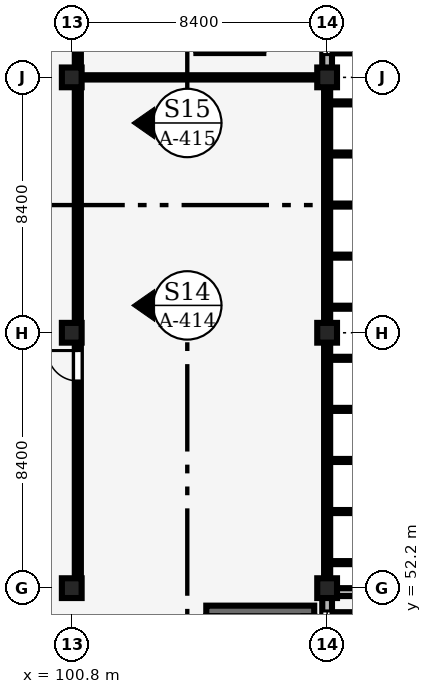
"""IFC4 building model, lengths in metres.
Left out: names, types, materials, properties, quantities, classifications, styles, units other than length and angle.
Written with IfcOpenShell. Run it as: python <this file> out.ifc"""

import sys

from ifc_helpers import new_model, si_unit, direction, frame, frame_2d, origin, origin_2d, place, context, subcontext, project, spatial, rectangle, extrude, element, fill, save


model = new_model("IFC4")
c1 = context("Model", 3, precision=1e-05, world=origin(), true_north=direction((0.0, 1.0)))
c2 = subcontext(c1, "Body", "Model", "MODEL_VIEW")
j1 = project(units=[si_unit("LENGTHUNIT", "METRE"), si_unit("PLANEANGLEUNIT", "RADIAN")], contexts=[c1])
p1 = place(None, origin())
s1 = spatial("IfcSite", under=j1, at=p1, CompositionType="ELEMENT")
p2 = place(p1, origin())
s2 = spatial("IfcBuilding", under=s1, at=p2, CompositionType="ELEMENT")
p3 = place(p2, frame((0.0, 0.0, 4.8)))
s3 = spatial("IfcBuildingStorey", under=s2, at=p3, CompositionType="ELEMENT", Elevation=4.8)
for number, where, z_axis, x_axis in (
    (1, (100.8, 52.2, 0.0), (0.0, 0.0, 1.0), (1.0, 0.0, 0.0)),
    (2, (100.8, 60.6, 0.0), (0.0, 0.0, 1.0), (1.0, 0.0, 0.0)),
    (3, (100.8, 69.0, 0.0), (0.0, 0.0, 1.0), (1.0, 0.0, 0.0)),
    (4, (109.2, 52.2, 0.0), (0.0, 0.0, 1.0), (1.0, 0.0, 0.0)),
    (5, (109.2, 60.6, 0.0), (0.0, 0.0, 1.0), (1.0, 0.0, 0.0)),
    (6, (109.2, 69.0, 0.0), (0.0, 0.0, 1.0), (1.0, 0.0, 0.0)),
):
    element("IfcColumn", number, at=place(p3, frame(where, z_axis=z_axis, x_axis=x_axis)), inside=s3, PredefinedType="COLUMN", context=c2, shape_type="SweptSolid", body=[
        extrude(rectangle(XDim=0.65, YDim=0.65, at=origin_2d()), origin(), (0.0, 0.0, 1.0), 4.2),
    ])
p4 = place(p3, frame((109.2, 44.1, 0.0), z_axis=(0.0, 0.0, 1.0), x_axis=(0.0, 1.0, 0.0)))
e7 = element("IfcWall", 7, at=p4, inside=s3, PredefinedType="SOLIDWALL", context=c2, shape_type="SweptSolid", body=[
    extrude(rectangle(XDim=7.8, YDim=0.32, at=frame_2d((3.9, 0.0))), origin(), (0.0, 0.0, 1.0), 3.3),
])
p5 = place(p4, frame((0.45, 0.0, 0.85)))
e8 = element("IfcOpeningElement", 8, at=p5, cuts=e7, PredefinedType="OPENING", context=c2, shape_type="SweptSolid", body=[
    extrude(rectangle(XDim=1.2, YDim=1.8, at=frame_2d((0.6, 0.9))), frame((0.0, 0.17, 0.0), z_axis=(0.0, -1.0, 0.0), x_axis=(1.0, 0.0, 0.0)), (0.0, 0.0, 1.0), 0.34),
])
p6 = place(p4, frame((6.15, 0.0, 0.85)))
e9 = element("IfcOpeningElement", 9, at=p6, cuts=e7, PredefinedType="OPENING", context=c2, shape_type="SweptSolid", body=[
    extrude(rectangle(XDim=1.2, YDim=1.8, at=frame_2d((0.6, 0.9))), frame((0.0, 0.17, 0.0), z_axis=(0.0, -1.0, 0.0), x_axis=(1.0, 0.0, 0.0)), (0.0, 0.0, 1.0), 0.34),
])
p7 = place(p3, frame((109.2, 69.3, 0.0), z_axis=(0.0, 0.0, 1.0), x_axis=(0.0, 1.0, 0.0)))
e10 = element("IfcWall", 10, at=p7, inside=s3, PredefinedType="SOLIDWALL", context=c2, shape_type="SweptSolid", body=[
    extrude(rectangle(XDim=7.8, YDim=0.32, at=frame_2d((3.9, 0.0))), origin(), (0.0, 0.0, 1.0), 3.25),
])
p8 = place(p7, frame((0.45, 0.0, 0.85)))
e11 = element("IfcOpeningElement", 11, at=p8, cuts=e10, PredefinedType="OPENING", context=c2, shape_type="SweptSolid", body=[
    extrude(rectangle(XDim=1.2, YDim=1.8, at=frame_2d((0.6, 0.9))), frame((0.0, 0.17, 0.0), z_axis=(0.0, -1.0, 0.0), x_axis=(1.0, 0.0, 0.0)), (0.0, 0.0, 1.0), 0.34),
])
p9 = place(p7, frame((6.15, 0.0, 0.85)))
e12 = element("IfcOpeningElement", 12, at=p9, cuts=e10, PredefinedType="OPENING", context=c2, shape_type="SweptSolid", body=[
    extrude(rectangle(XDim=1.2, YDim=1.8, at=frame_2d((0.6, 0.9))), frame((0.0, 0.17, 0.0), z_axis=(0.0, -1.0, 0.0), x_axis=(1.0, 0.0, 0.0)), (0.0, 0.0, 1.0), 0.34),
])
p10 = place(p3, frame((109.33, 52.07, 0.0), z_axis=(0.0, 0.0, 1.0), x_axis=(1.0, 0.0, 0.0)))
e13 = element("IfcWall", 13, at=p10, inside=s3, PredefinedType="PARAPET", context=c2, shape_type="SweptSolid", body=[
    extrude(rectangle(XDim=33.34, YDim=0.26, at=frame_2d((16.67, 0.0))), origin(), (0.0, 0.0, 1.0), 0.85),
])
p11 = place(p3, frame((105.225, 51.45, 0.0), z_axis=(0.0, 0.0, 1.0), x_axis=(1.0, 0.0, 0.0)))
e14 = element("IfcWall", 14, at=p11, inside=s3, PredefinedType="SHEAR", context=c2, shape_type="SweptSolid", body=[
    extrude(rectangle(XDim=3.55, YDim=0.35, at=frame_2d((1.775, 0.0))), origin(), (0.0, 0.0, 1.0), 3.92),
])
p12 = place(p3, frame((104.9, 69.85, 0.0), z_axis=(0.0, 0.0, 1.0), x_axis=(1.0, 0.0, 0.0)))
e15 = element("IfcWall", 15, at=p12, inside=s3, PredefinedType="PARTITIONING", context=c2, shape_type="SweptSolid", body=[
    extrude(rectangle(XDim=2.2, YDim=0.1, at=frame_2d((1.1, 0.0))), origin(), (0.0, 0.0, 1.0), 3.9),
])
p13 = place(p3, frame((101.105, 69.0, 0.0), z_axis=(0.0, 0.0, 1.0), x_axis=(1.0, 0.0, 0.0)))
e16 = element("IfcWall", 16, at=p13, inside=s3, PredefinedType="PARTITIONING", context=c2, shape_type="SweptSolid", body=[
    extrude(rectangle(XDim=7.99, YDim=0.14, at=frame_2d((3.995, 0.0))), origin(), (0.0, 0.0, 1.0), 3.15),
])
p14 = place(p3, frame((101.0, 52.535, 0.0), z_axis=(0.0, 0.0, 1.0), x_axis=(0.0, 1.0, 0.0)))
e17 = element("IfcWall", 17, at=p14, inside=s3, PredefinedType="PARTITIONING", context=c2, shape_type="SweptSolid", body=[
    extrude(rectangle(XDim=7.73, YDim=0.2, at=frame_2d((3.865, 0.0))), origin(), (0.0, 0.0, 1.0), 3.1),
])
p15 = place(p14, frame((6.48, 0.0, 0.0)))
e18 = element("IfcOpeningElement", 18, at=p15, cuts=e17, PredefinedType="OPENING", context=c2, shape_type="SweptSolid", body=[
    extrude(rectangle(XDim=1.0, YDim=2.15, at=frame_2d((0.5, 1.075))), frame((0.0, 0.11, 0.0), z_axis=(0.0, -1.0, 0.0), x_axis=(1.0, 0.0, 0.0)), (0.0, 0.0, 1.0), 0.22),
])
p16 = place(p3, frame((101.0, 60.935, 0.0), z_axis=(0.0, 0.0, 1.0), x_axis=(0.0, 1.0, 0.0)))
e19 = element("IfcWall", 19, at=p16, inside=s3, PredefinedType="PARTITIONING", context=c2, shape_type="SweptSolid", body=[
    extrude(rectangle(XDim=7.73, YDim=0.2, at=frame_2d((3.865, 0.0))), origin(), (0.0, 0.0, 1.0), 3.05),
])
p17 = place(p3, frame((101.0, 69.335, 0.0), z_axis=(0.0, 0.0, 1.0), x_axis=(0.0, 1.0, 0.0)))
e20 = element("IfcWall", 20, at=p17, inside=s3, PredefinedType="PARTITIONING", context=c2, shape_type="SweptSolid", body=[
    extrude(rectangle(XDim=7.73, YDim=0.2, at=frame_2d((3.865, 0.0))), origin(), (0.0, 0.0, 1.0), 3.05),
])
p18 = place(p17, frame((1.365, 0.0, 0.0)))
e21 = element("IfcOpeningElement", 21, at=p18, cuts=e20, PredefinedType="OPENING", context=c2, shape_type="SweptSolid", body=[
    extrude(rectangle(XDim=0.9, YDim=2.1, at=frame_2d((0.45, 1.05))), frame((0.0, 0.11, 0.0), z_axis=(0.0, -1.0, 0.0), x_axis=(1.0, 0.0, 0.0)), (0.0, 0.0, 1.0), 0.22),
])
p19 = place(p17, frame((4.94, 0.0, 0.0)))
e22 = element("IfcOpeningElement", 22, at=p19, cuts=e20, PredefinedType="OPENING", context=c2, shape_type="SweptSolid", body=[
    extrude(rectangle(XDim=1.05, YDim=2.2, at=frame_2d((0.525, 1.1))), frame((0.0, 0.11, 0.0), z_axis=(0.0, -1.0, 0.0), x_axis=(1.0, 0.0, 0.0)), (0.0, 0.0, 1.0), 0.22),
])
p20 = place(p6, origin())
e23 = element("IfcWindow", 23, at=p20, inside=s3, PartitioningType="SINGLE_PANEL", PredefinedType="WINDOW", context=c2, shape_type="SweptSolid", body=[
    extrude(rectangle(XDim=1.2, YDim=1.8, at=frame_2d((0.6, 0.9))), frame((0.0, 0.03, 0.0), z_axis=(0.0, -1.0, 0.0), x_axis=(1.0, 0.0, 0.0)), (0.0, 0.0, 1.0), 0.06),
])
fill(e9, e23)
p21 = place(p8, origin())
e24 = element("IfcWindow", 24, at=p21, inside=s3, PartitioningType="SINGLE_PANEL", PredefinedType="WINDOW", context=c2, shape_type="SweptSolid", body=[
    extrude(rectangle(XDim=1.2, YDim=1.8, at=frame_2d((0.6, 0.9))), frame((0.0, 0.03, 0.0), z_axis=(0.0, -1.0, 0.0), x_axis=(1.0, 0.0, 0.0)), (0.0, 0.0, 1.0), 0.06),
])
fill(e11, e24)
p22 = place(p15, origin())
e25 = element("IfcDoor", 25, at=p22, inside=s3, OperationType="SINGLE_SWING_RIGHT", PredefinedType="DOOR", context=c2, shape_type="SweptSolid", body=[
    extrude(rectangle(XDim=1.0, YDim=2.15, at=frame_2d((0.5, 1.075))), frame((0.0, 0.025, 0.0), z_axis=(0.0, -1.0, 0.0), x_axis=(1.0, 0.0, 0.0)), (0.0, 0.0, 1.0), 0.05),
])
fill(e18, e25)
save(model, sys.argv[1])
